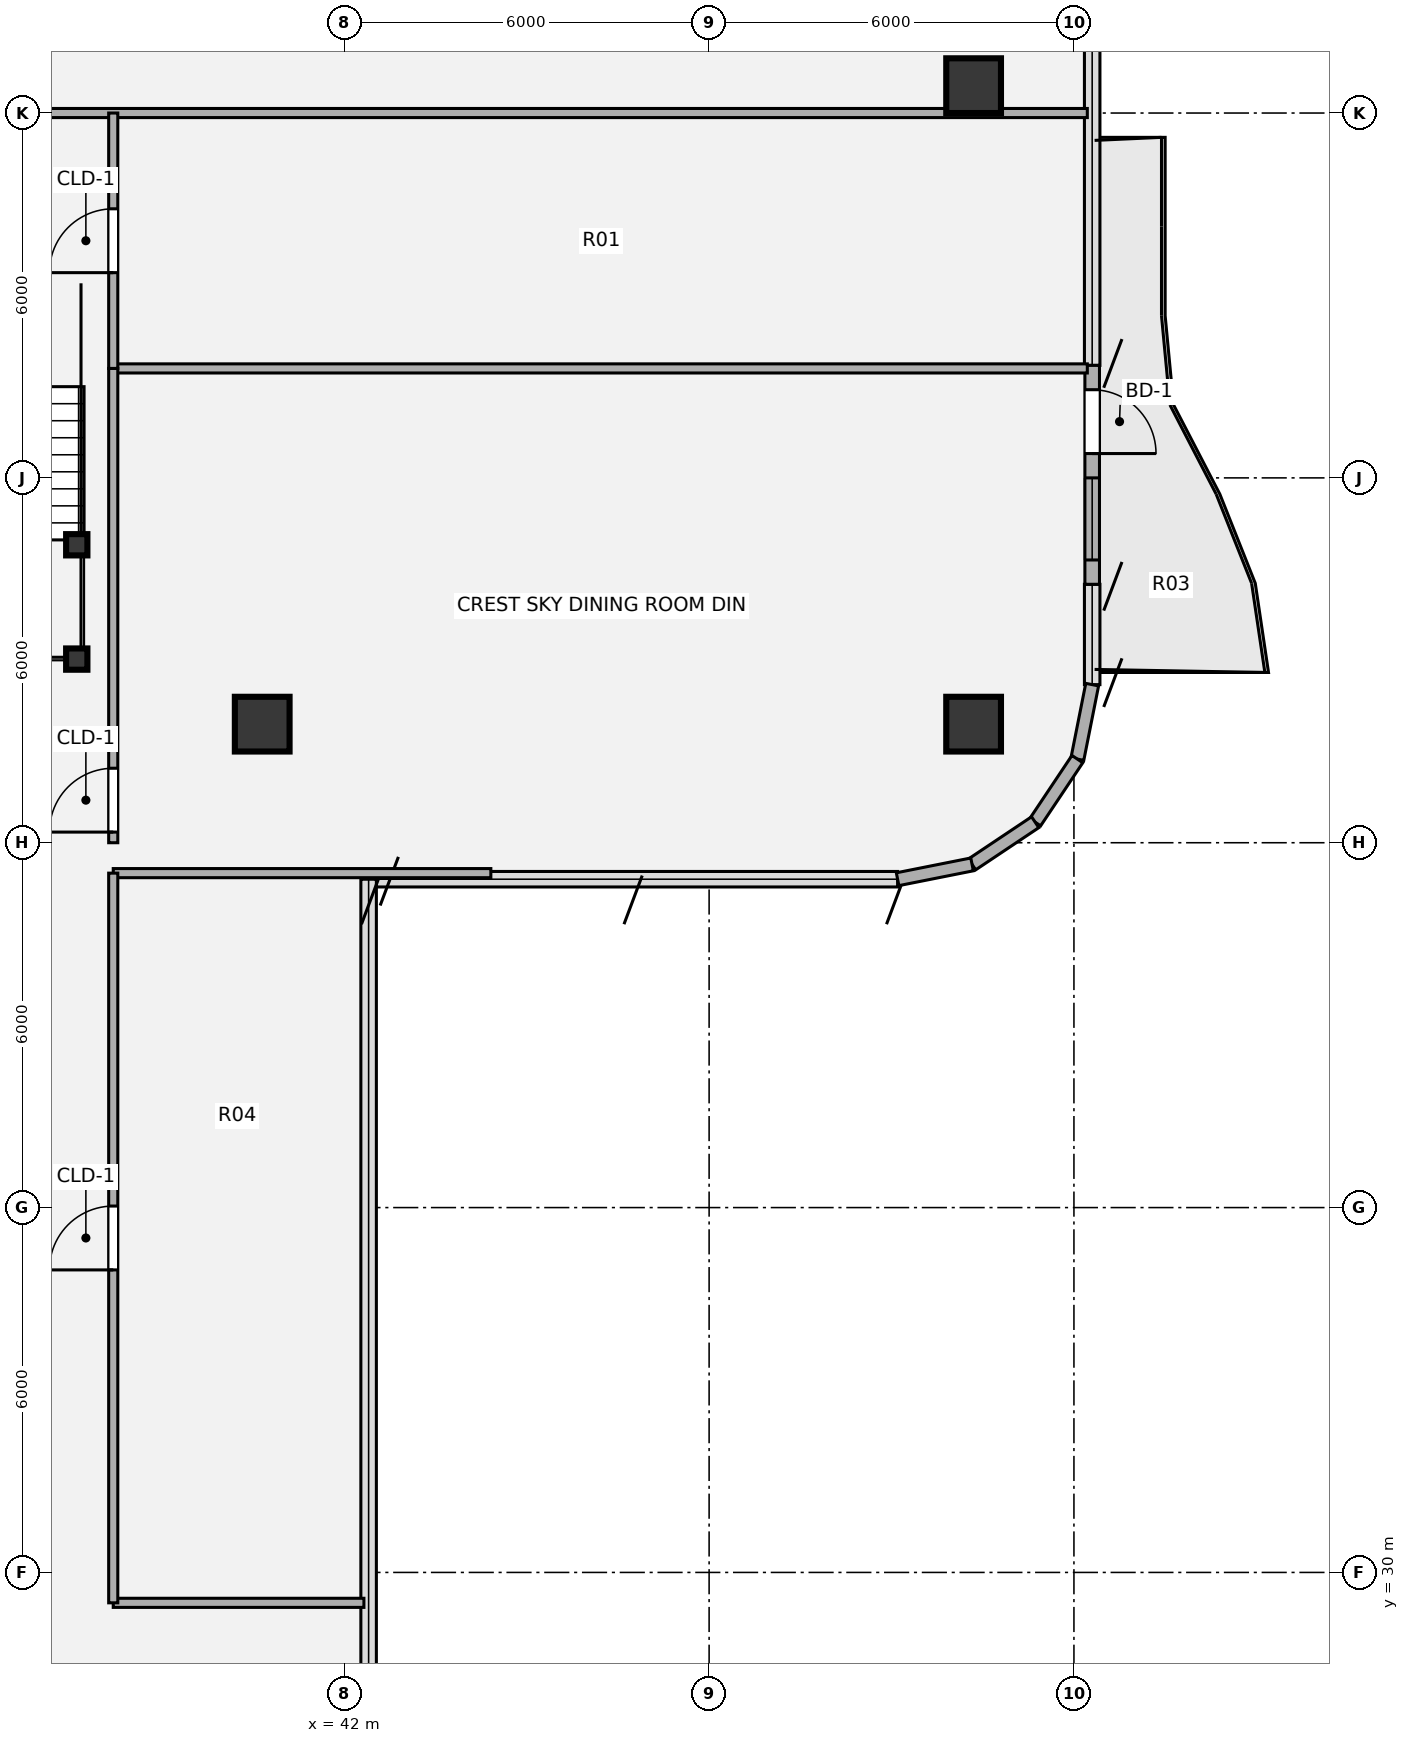
"""IFC4 building model, lengths in metres.
Left out: names, types, materials, properties, quantities, classifications, styles, units other than length and angle.
Written with IfcOpenShell. Run it as: python <this file> out.ifc"""

import sys

from ifc_helpers import new_model, si_unit, direction, frame, frame_2d, origin, origin_2d, place, context, subcontext, project, spatial, rectangle, hollow_rectangle, hollow_circle, extrude, source, transform, mapped, element, fill, save


model = new_model("IFC4")
c1 = context("Model", 3, precision=1e-05, world=origin(), true_north=direction((0.0, 1.0)))
c2 = subcontext(c1, "Body", "Model", "MODEL_VIEW")
j1 = project(units=[si_unit("LENGTHUNIT", "METRE"), si_unit("PLANEANGLEUNIT", "RADIAN")], contexts=[c1])
p1 = place(None, origin())
s1 = spatial("IfcSite", under=j1, at=p1, CompositionType="ELEMENT")
p2 = place(p1, origin())
s2 = spatial("IfcBuilding", under=s1, at=p2, CompositionType="ELEMENT")
p3 = place(p2, frame((0.0, 0.0, 287.28)))
s3 = spatial("IfcBuildingStorey", under=s2, at=p3, CompositionType="ELEMENT", Elevation=287.28)
m1 = source(origin(), c2, "Body", "SweptSolid", [
    extrude(hollow_circle(Radius=0.45, WallThickness=0.032, at=origin_2d()), origin(), (0.0, 0.0, 1.0), 3.78),
])
for number, where, z_axis, x_axis in (
    (1, (52.35, 43.95, 0.0), (0.0, 0.0, 1.0), (1.0, 0.0, 0.0)),
    (2, (52.35, 54.45, 0.0), (0.0, 0.0, 1.0), (1.0, 0.0, 0.0)),
    (3, (40.65, 43.95, 0.0), (0.0, 0.0, 1.0), (1.0, 0.0, 0.0)),
):
    element("IfcColumn", number, at=place(p3, frame(where, z_axis=z_axis, x_axis=x_axis)), inside=s3, PredefinedType="COLUMN", context=c2, shape_type="MappedRepresentation", body=[
        mapped(m1, transform((0.0, 0.0, 0.0), x_axis=(1.0, 0.0, 0.0), y_axis=(0.0, 1.0, 0.0), z_axis=(0.0, 0.0, 1.0), scale=1.0)),
    ])
m2 = source(origin(), c2, "Body", "SweptSolid", [
    extrude(hollow_rectangle(XDim=0.35, YDim=0.35, WallThickness=0.016, OuterFilletRadius=0.032, at=origin_2d()), origin(), (0.0, 0.0, 1.0), 1.69),
])
for number, where, z_axis, x_axis in (
    (4, (37.6, 45.02, 0.0), (0.0, 0.0, 1.0), (1.0, 0.0, 0.0)),
    (5, (37.6, 46.9, 0.0), (0.0, 0.0, 1.0), (1.0, 0.0, 0.0)),
):
    element("IfcColumn", number, at=place(p3, frame(where, z_axis=z_axis, x_axis=x_axis)), inside=s3, PredefinedType="COLUMN", context=c2, shape_type="MappedRepresentation", body=[
        mapped(m2, transform((0.0, 0.0, 0.0), x_axis=(1.0, 0.0, 0.0), y_axis=(0.0, 1.0, 0.0), z_axis=(0.0, 0.0, 1.0), scale=1.0)),
    ])
p4 = place(p3, frame((54.3, 49.85, 0.0), z_axis=(0.0, 0.0, 1.0), x_axis=(0.0, -1.0, 0.0)))
e6 = element("IfcWall", 6, at=p4, inside=s3, PredefinedType="SOLIDWALL", context=c2, shape_type="SweptSolid", body=[
    extrude(rectangle(XDim=3.6, YDim=0.24, at=frame_2d((1.8, 0.0))), origin(), (0.0, 0.0, 1.0), 3.46),
])
p5 = place(p4, frame((0.4, 0.0, 0.0)))
e7 = element("IfcOpeningElement", 7, at=p5, cuts=e6, PredefinedType="OPENING", context=c2, shape_type="SweptSolid", body=[
    extrude(rectangle(XDim=1.05, YDim=2.15, at=origin_2d()), frame((0.525, 0.13, 1.075), z_axis=(0.0, -1.0, 0.0), x_axis=(1.0, 0.0, 0.0)), (0.0, 0.0, 1.0), 0.26),
])
p6 = place(p4, frame((1.85, 0.0, 0.85)))
e8 = element("IfcOpeningElement", 8, at=p6, cuts=e6, PredefinedType="OPENING", context=c2, shape_type="SweptSolid", body=[
    extrude(rectangle(XDim=1.35, YDim=1.35, at=origin_2d()), frame((0.675, 0.13, 0.675), z_axis=(0.0, -1.0, 0.0), x_axis=(1.0, 0.0, 0.0)), (0.0, 0.0, 1.0), 0.26),
])
for number, where, z_axis, x_axis in (
    (9, (54.3, 44.6, 0.0), (0.0, 0.0, 1.0), (-0.195, -0.981, 0.0)),
    (10, (54.056, 43.375, 0.0), (0.0, 0.0, 1.0), (-0.556, -0.831, 0.0)),
    (11, (53.363, 42.337, 0.0), (0.0, 0.0, 1.0), (-0.831, -0.556, 0.0)),
    (12, (52.325, 41.644, 0.0), (0.0, 0.0, 1.0), (-0.981, -0.195, 0.0)),
):
    element("IfcWall", number, at=place(p3, frame(where, z_axis=z_axis, x_axis=x_axis)), inside=s3, PredefinedType="SOLIDWALL", context=c2, shape_type="SweptSolid", body=[
        extrude(rectangle(XDim=1.249, YDim=0.215, at=frame_2d((0.624, 0.0))), origin(), (0.0, 0.0, 1.0), 3.46),
    ])
p7 = place(p3, frame((38.2, 29.5, 0.0), z_axis=(0.0, 0.0, 1.0), x_axis=(1.0, 0.0, 0.0)))
e13 = element("IfcWall", 13, at=p7, inside=s3, PredefinedType="PARTITIONING", context=c2, shape_type="SweptSolid", body=[
    extrude(rectangle(XDim=4.123, YDim=0.15, at=frame_2d((2.062, 0.0))), origin(), (0.0, 0.0, 1.0), 3.43),
])
p8 = place(p3, frame((38.2, 41.5, 0.0), z_axis=(0.0, 0.0, 1.0), x_axis=(1.0, 0.0, 0.0)))
e14 = element("IfcWall", 14, at=p8, inside=s3, PredefinedType="PARTITIONING", context=c2, shape_type="SweptSolid", body=[
    extrude(rectangle(XDim=6.21, YDim=0.15, at=frame_2d((3.105, 0.0))), origin(), (0.0, 0.0, 1.0), 3.43),
])
p9 = place(p3, frame((38.2, 49.8, 0.0), z_axis=(0.0, 0.0, 1.0), x_axis=(1.0, 0.0, 0.0)))
e15 = element("IfcWall", 15, at=p9, inside=s3, PredefinedType="PARTITIONING", context=c2, shape_type="SweptSolid", body=[
    extrude(rectangle(XDim=16.02, YDim=0.15, at=frame_2d((8.01, 0.0))), origin(), (0.0, 0.0, 1.0), 2.912),
])
p10 = place(p3, frame((17.78, 54.0, 0.0), z_axis=(0.0, 0.0, 1.0), x_axis=(1.0, 0.0, 0.0)))
e16 = element("IfcWall", 16, at=p10, inside=s3, PredefinedType="PARTITIONING", context=c2, shape_type="SweptSolid", body=[
    extrude(rectangle(XDim=36.44, YDim=0.15, at=frame_2d((18.22, 0.0))), origin(), (0.0, 0.0, 1.0), 2.985),
])
p11 = place(p10, frame((17.695, 0.0, 0.0)))
e17 = element("IfcOpeningElement", 17, at=p11, cuts=e16, PredefinedType="OPENING", context=c2, shape_type="SweptSolid", body=[
    extrude(rectangle(XDim=1.05, YDim=2.1, at=origin_2d()), frame((0.525, 0.085, 1.05), z_axis=(0.0, -1.0, 0.0), x_axis=(1.0, 0.0, 0.0)), (0.0, 0.0, 1.0), 0.17),
])
p12 = place(p3, frame((38.2, 29.5, 0.0), z_axis=(0.0, 0.0, 1.0), x_axis=(0.0, 1.0, 0.0)))
e18 = element("IfcWall", 18, at=p12, inside=s3, PredefinedType="PARTITIONING", context=c2, shape_type="SweptSolid", body=[
    extrude(rectangle(XDim=12.0, YDim=0.15, at=frame_2d((6.0, 0.0))), origin(), (0.0, 0.0, 1.0), 3.43),
])
p13 = place(p12, frame((5.475, 0.0, 0.0)))
e19 = element("IfcOpeningElement", 19, at=p13, cuts=e18, PredefinedType="OPENING", context=c2, shape_type="SweptSolid", body=[
    extrude(rectangle(XDim=1.05, YDim=2.1, at=origin_2d()), frame((0.525, 0.085, 1.05), z_axis=(0.0, -1.0, 0.0), x_axis=(1.0, 0.0, 0.0)), (0.0, 0.0, 1.0), 0.17),
])
p14 = place(p3, frame((38.2, 42.0, 0.0), z_axis=(0.0, 0.0, 1.0), x_axis=(0.0, 1.0, 0.0)))
e20 = element("IfcWall", 20, at=p14, inside=s3, PredefinedType="PARTITIONING", context=c2, shape_type="SweptSolid", body=[
    extrude(rectangle(XDim=7.8, YDim=0.15, at=frame_2d((3.9, 0.0))), origin(), (0.0, 0.0, 1.0), 3.43),
])
p15 = place(p14, frame((0.175, 0.0, 0.0)))
e21 = element("IfcOpeningElement", 21, at=p15, cuts=e20, PredefinedType="OPENING", context=c2, shape_type="SweptSolid", body=[
    extrude(rectangle(XDim=1.05, YDim=2.1, at=origin_2d()), frame((0.525, 0.085, 1.05), z_axis=(0.0, -1.0, 0.0), x_axis=(1.0, 0.0, 0.0)), (0.0, 0.0, 1.0), 0.17),
])
p16 = place(p3, frame((38.2, 49.8, 0.0), z_axis=(0.0, 0.0, 1.0), x_axis=(0.0, 1.0, 0.0)))
e22 = element("IfcWall", 22, at=p16, inside=s3, PredefinedType="PARTITIONING", context=c2, shape_type="SweptSolid", body=[
    extrude(rectangle(XDim=4.2, YDim=0.15, at=frame_2d((2.1, 0.0))), origin(), (0.0, 0.0, 1.0), 3.43),
])
p17 = place(p16, frame((1.575, 0.0, 0.0)))
e23 = element("IfcOpeningElement", 23, at=p17, cuts=e22, PredefinedType="OPENING", context=c2, shape_type="SweptSolid", body=[
    extrude(rectangle(XDim=1.05, YDim=2.1, at=origin_2d()), frame((0.525, 0.085, 1.05), z_axis=(0.0, -1.0, 0.0), x_axis=(1.0, 0.0, 0.0)), (0.0, 0.0, 1.0), 0.17),
])
m3 = source(origin(), c2, "Body", "SweptSolid", [
    extrude(rectangle(XDim=1.05, YDim=2.15, at=origin_2d()), frame((0.525, 0.025, 1.075), z_axis=(0.0, -1.0, 0.0), x_axis=(1.0, 0.0, 0.0)), (0.0, 0.0, 1.0), 0.05),
])
p18 = place(p5, origin())
e24 = element("IfcDoor", 24, at=p18, inside=s3, OperationType="SINGLE_SWING_RIGHT", PredefinedType="DOOR", context=c2, shape_type="MappedRepresentation", body=[
    mapped(m3, transform((0.0, 0.0, 0.0), x_axis=(1.0, 0.0, 0.0), y_axis=(0.0, 1.0, 0.0), z_axis=(0.0, 0.0, 1.0), scale=1.0)),
])
fill(e7, e24)
m4 = source(origin(), c2, "Body", "SweptSolid", [
    extrude(rectangle(XDim=1.35, YDim=1.35, at=origin_2d()), frame((0.675, 0.03, 0.675), z_axis=(0.0, -1.0, 0.0), x_axis=(1.0, 0.0, 0.0)), (0.0, 0.0, 1.0), 0.06),
])
p19 = place(p6, origin())
e25 = element("IfcWindow", 25, at=p19, inside=s3, PartitioningType="SINGLE_PANEL", PredefinedType="WINDOW", context=c2, shape_type="MappedRepresentation", body=[
    mapped(m4, transform((0.0, 0.0, 0.0), x_axis=(1.0, 0.0, 0.0), y_axis=(0.0, 1.0, 0.0), z_axis=(0.0, 0.0, 1.0), scale=1.0)),
])
fill(e8, e25)
m5 = source(origin(), c2, "Body", "SweptSolid", [
    extrude(rectangle(XDim=1.05, YDim=2.1, at=origin_2d()), frame((0.525, 0.025, 1.05), z_axis=(0.0, -1.0, 0.0), x_axis=(1.0, 0.0, 0.0)), (0.0, 0.0, 1.0), 0.05),
])
p20 = place(p13, origin())
e26 = element("IfcDoor", 26, at=p20, inside=s3, OperationType="SINGLE_SWING_LEFT", PredefinedType="DOOR", context=c2, shape_type="MappedRepresentation", body=[
    mapped(m5, transform((0.0, 0.0, 0.0), x_axis=(1.0, 0.0, 0.0), y_axis=(0.0, 1.0, 0.0), z_axis=(0.0, 0.0, 1.0), scale=1.0)),
])
fill(e19, e26)
p21 = place(p15, origin())
e27 = element("IfcDoor", 27, at=p21, inside=s3, OperationType="SINGLE_SWING_LEFT", PredefinedType="DOOR", context=c2, shape_type="MappedRepresentation", body=[
    mapped(m5, transform((0.0, 0.0, 0.0), x_axis=(1.0, 0.0, 0.0), y_axis=(0.0, 1.0, 0.0), z_axis=(0.0, 0.0, 1.0), scale=1.0)),
])
fill(e21, e27)
p22 = place(p17, origin())
e28 = element("IfcDoor", 28, at=p22, inside=s3, OperationType="SINGLE_SWING_LEFT", PredefinedType="DOOR", context=c2, shape_type="MappedRepresentation", body=[
    mapped(m5, transform((0.0, 0.0, 0.0), x_axis=(1.0, 0.0, 0.0), y_axis=(0.0, 1.0, 0.0), z_axis=(0.0, 0.0, 1.0), scale=1.0)),
])
fill(e23, e28)
save(model, sys.argv[1])
